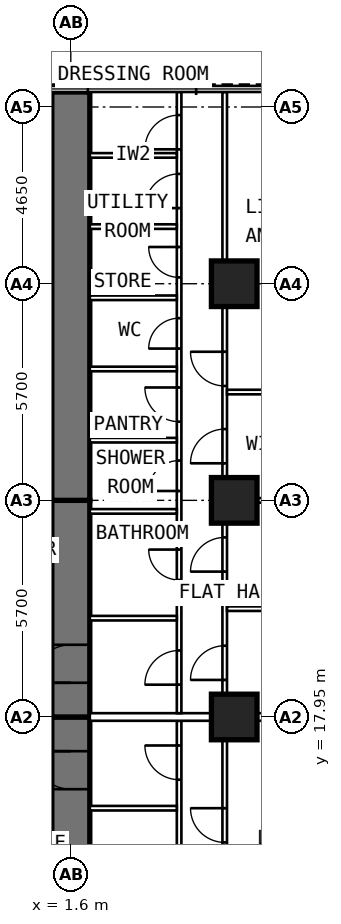
"""IFC4 building model, lengths in metres.
Left out: names, types, materials, properties, quantities, classifications, styles, units other than length and angle.
Written with IfcOpenShell. Run it as: python <this file> out.ifc"""

import sys

from ifc_helpers import new_model, si_unit, direction, frame, frame_2d, origin, origin_2d, place, context, subcontext, project, spatial, rectangle, extrude, element, fill, save


model = new_model("IFC4")
c1 = context("Model", 3, precision=1e-05, world=origin(), true_north=direction((0.0, 1.0)))
c2 = subcontext(c1, "Body", "Model", "MODEL_VIEW")
j1 = project(units=[si_unit("LENGTHUNIT", "METRE"), si_unit("PLANEANGLEUNIT", "RADIAN")], contexts=[c1])
p1 = place(None, origin())
s1 = spatial("IfcSite", under=j1, at=p1, CompositionType="ELEMENT")
p2 = place(p1, origin())
s2 = spatial("IfcBuilding", under=s1, at=p2, CompositionType="ELEMENT")
p3 = place(p2, frame((0.0, 0.0, 106.0)))
s3 = spatial("IfcBuildingStorey", under=s2, at=p3, CompositionType="ELEMENT", Elevation=106.0)
for number, where, z_axis, x_axis in (
    (1, (5.9, 17.95, 0.0), (0.0, 0.0, 1.0), (0.0, 1.0, 0.0)),
    (2, (5.9, 23.65, 0.0), (0.0, 0.0, 1.0), (0.0, 1.0, 0.0)),
    (3, (5.9, 29.35, 0.0), (0.0, 0.0, 1.0), (0.0, 1.0, 0.0)),
):
    element("IfcColumn", number, at=place(p3, frame(where, z_axis=z_axis, x_axis=x_axis)), inside=s3, PredefinedType="COLUMN", context=c2, shape_type="SweptSolid", body=[
        extrude(rectangle(XDim=1.2, YDim=1.2, at=origin_2d()), origin(), (0.0, 0.0, 1.0), 3.6),
    ])
p4 = place(p3, frame((1.6, 9.6, 0.0), z_axis=(0.0, 0.0, 1.0), x_axis=(0.0, 1.0, 0.0)))
e4 = element("IfcWall", 4, at=p4, inside=s3, PredefinedType="SHEAR", context=c2, shape_type="SweptSolid", body=[
    extrude(rectangle(XDim=8.35, YDim=1.0, at=frame_2d((4.175, 0.0))), origin(), (0.0, 0.0, 1.0), 3.6),
])
p5 = place(p4, frame((6.45, 0.0, 0.0)))
e5 = element("IfcOpeningElement", 5, at=p5, cuts=e4, PredefinedType="OPENING", context=c2, shape_type="SweptSolid", body=[
    extrude(rectangle(XDim=1.0, YDim=2.1, at=frame_2d((0.5, 1.05))), frame((0.0, 0.512, 0.0), z_axis=(0.0, -1.0, 0.0), x_axis=(1.0, 0.0, 0.0)), (0.0, 0.0, 1.0), 1.024),
])
p6 = place(p3, frame((1.6, 17.95, 0.0), z_axis=(0.0, 0.0, 1.0), x_axis=(0.0, 1.0, 0.0)))
e6 = element("IfcWall", 6, at=p6, inside=s3, PredefinedType="SHEAR", context=c2, shape_type="SweptSolid", body=[
    extrude(rectangle(XDim=5.7, YDim=1.0, at=frame_2d((2.85, 0.0))), origin(), (0.0, 0.0, 1.0), 3.6),
])
p7 = place(p6, frame((0.9, 0.0, 0.0)))
e7 = element("IfcOpeningElement", 7, at=p7, cuts=e6, PredefinedType="OPENING", context=c2, shape_type="SweptSolid", body=[
    extrude(rectangle(XDim=1.0, YDim=2.1, at=frame_2d((0.5, 1.05))), frame((0.0, 0.512, 0.0), z_axis=(0.0, -1.0, 0.0), x_axis=(1.0, 0.0, 0.0)), (0.0, 0.0, 1.0), 1.024),
])
p8 = place(p3, frame((1.6, 23.65, 0.0), z_axis=(0.0, 0.0, 1.0), x_axis=(0.0, 1.0, 0.0)))
e8 = element("IfcWall", 8, at=p8, inside=s3, PredefinedType="SHEAR", context=c2, shape_type="SweptSolid", body=[
    extrude(rectangle(XDim=10.745, YDim=1.0, at=frame_2d((5.373, 0.0))), origin(), (0.0, 0.0, 1.0), 3.6),
])
p9 = place(p3, frame((4.45, 10.1, 0.0), z_axis=(0.0, 0.0, 1.0), x_axis=(0.0, 1.0, 0.0)))
e9 = element("IfcWall", 9, at=p9, inside=s3, PredefinedType="PARTITIONING", context=c2, shape_type="SweptSolid", body=[
    extrude(rectangle(XDim=7.75, YDim=0.12, at=frame_2d((3.875, 0.0))), origin(), (0.0, 0.0, 1.0), 3.35),
])
p10 = place(p9, frame((0.56, 0.0, 0.0)))
e10 = element("IfcOpeningElement", 10, at=p10, cuts=e9, PredefinedType="OPENING", context=c2, shape_type="SweptSolid", body=[
    extrude(rectangle(XDim=0.9, YDim=2.1, at=frame_2d((0.45, 1.05))), frame((0.0, 0.072, 0.0), z_axis=(0.0, -1.0, 0.0), x_axis=(1.0, 0.0, 0.0)), (0.0, 0.0, 1.0), 0.144),
])
p11 = place(p9, frame((3.385, 0.0, 0.0)))
e11 = element("IfcOpeningElement", 11, at=p11, cuts=e9, PredefinedType="OPENING", context=c2, shape_type="SweptSolid", body=[
    extrude(rectangle(XDim=0.8, YDim=2.1, at=frame_2d((0.4, 1.05))), frame((0.0, 0.072, 0.0), z_axis=(0.0, -1.0, 0.0), x_axis=(1.0, 0.0, 0.0)), (0.0, 0.0, 1.0), 0.144),
])
p12 = place(p9, frame((6.2, 0.0, 0.0)))
e12 = element("IfcOpeningElement", 12, at=p12, cuts=e9, PredefinedType="OPENING", context=c2, shape_type="SweptSolid", body=[
    extrude(rectangle(XDim=0.9, YDim=2.1, at=frame_2d((0.45, 1.05))), frame((0.0, 0.072, 0.0), z_axis=(0.0, -1.0, 0.0), x_axis=(1.0, 0.0, 0.0)), (0.0, 0.0, 1.0), 0.144),
])
p13 = place(p3, frame((5.65, 9.6, 0.0), z_axis=(0.0, 0.0, 1.0), x_axis=(0.0, 1.0, 0.0)))
e13 = element("IfcWall", 13, at=p13, inside=s3, PredefinedType="PARTITIONING", context=c2, shape_type="SweptSolid", body=[
    extrude(rectangle(XDim=8.1, YDim=0.12, at=frame_2d((4.05, 0.0))), origin(), (0.0, 0.0, 1.0), 3.35),
])
p14 = place(p13, frame((5.05, 0.0, 0.0)))
e14 = element("IfcOpeningElement", 14, at=p14, cuts=e13, PredefinedType="OPENING", context=c2, shape_type="SweptSolid", body=[
    extrude(rectangle(XDim=0.9, YDim=2.1, at=frame_2d((0.45, 1.05))), frame((0.0, 0.072, 0.0), z_axis=(0.0, -1.0, 0.0), x_axis=(1.0, 0.0, 0.0)), (0.0, 0.0, 1.0), 0.144),
])
p15 = place(p3, frame((2.1, 15.55, 0.0), z_axis=(0.0, 0.0, 1.0), x_axis=(1.0, 0.0, 0.0)))
e15 = element("IfcWall", 15, at=p15, inside=s3, PredefinedType="PARTITIONING", context=c2, shape_type="SweptSolid", body=[
    extrude(rectangle(XDim=2.29, YDim=0.12, at=frame_2d((1.145, 0.0))), origin(), (0.0, 0.0, 1.0), 3.35),
])
p16 = place(p3, frame((4.45, 18.05, 0.0), z_axis=(0.0, 0.0, 1.0), x_axis=(0.0, 1.0, 0.0)))
e16 = element("IfcWall", 16, at=p16, inside=s3, PredefinedType="PARTITIONING", context=c2, shape_type="SweptSolid", body=[
    extrude(rectangle(XDim=16.345, YDim=0.12, at=frame_2d((8.172, 0.0))), origin(), (0.0, 0.0, 1.0), 3.35),
])
p17 = place(p16, frame((0.75, 0.0, 0.0)))
e17 = element("IfcOpeningElement", 17, at=p17, cuts=e16, PredefinedType="OPENING", context=c2, shape_type="SweptSolid", body=[
    extrude(rectangle(XDim=0.9, YDim=2.1, at=frame_2d((0.45, 1.05))), frame((0.0, 0.072, 0.0), z_axis=(0.0, -1.0, 0.0), x_axis=(1.0, 0.0, 0.0)), (0.0, 0.0, 1.0), 0.144),
])
p18 = place(p16, frame((3.505, 0.0, 0.0)))
e18 = element("IfcOpeningElement", 18, at=p18, cuts=e16, PredefinedType="OPENING", context=c2, shape_type="SweptSolid", body=[
    extrude(rectangle(XDim=0.8, YDim=2.1, at=frame_2d((0.4, 1.05))), frame((0.0, 0.072, 0.0), z_axis=(0.0, -1.0, 0.0), x_axis=(1.0, 0.0, 0.0)), (0.0, 0.0, 1.0), 0.144),
])
p19 = place(p16, frame((5.847, 0.0, 0.0)))
e19 = element("IfcOpeningElement", 19, at=p19, cuts=e16, PredefinedType="OPENING", context=c2, shape_type="SweptSolid", body=[
    extrude(rectangle(XDim=0.8, YDim=2.1, at=frame_2d((0.4, 1.05))), frame((0.0, 0.072, 0.0), z_axis=(0.0, -1.0, 0.0), x_axis=(1.0, 0.0, 0.0)), (0.0, 0.0, 1.0), 0.144),
])
p20 = place(p16, frame((7.67, 0.0, 0.0)))
e20 = element("IfcOpeningElement", 20, at=p20, cuts=e16, PredefinedType="OPENING", context=c2, shape_type="SweptSolid", body=[
    extrude(rectangle(XDim=0.9, YDim=2.1, at=frame_2d((0.45, 1.05))), frame((0.0, 0.072, 0.0), z_axis=(0.0, -1.0, 0.0), x_axis=(1.0, 0.0, 0.0)), (0.0, 0.0, 1.0), 0.144),
])
p21 = place(p16, frame((9.593, 0.0, 0.0)))
e21 = element("IfcOpeningElement", 21, at=p21, cuts=e16, PredefinedType="OPENING", context=c2, shape_type="SweptSolid", body=[
    extrude(rectangle(XDim=0.8, YDim=2.1, at=frame_2d((0.4, 1.05))), frame((0.0, 0.072, 0.0), z_axis=(0.0, -1.0, 0.0), x_axis=(1.0, 0.0, 0.0)), (0.0, 0.0, 1.0), 0.144),
])
p22 = place(p16, frame((11.467, 0.0, 0.0)))
e22 = element("IfcOpeningElement", 22, at=p22, cuts=e16, PredefinedType="OPENING", context=c2, shape_type="SweptSolid", body=[
    extrude(rectangle(XDim=0.8, YDim=2.1, at=frame_2d((0.4, 1.05))), frame((0.0, 0.072, 0.0), z_axis=(0.0, -1.0, 0.0), x_axis=(1.0, 0.0, 0.0)), (0.0, 0.0, 1.0), 0.144),
])
p23 = place(p16, frame((13.29, 0.0, 0.0)))
e23 = element("IfcOpeningElement", 23, at=p23, cuts=e16, PredefinedType="OPENING", context=c2, shape_type="SweptSolid", body=[
    extrude(rectangle(XDim=0.9, YDim=2.1, at=frame_2d((0.45, 1.05))), frame((0.0, 0.072, 0.0), z_axis=(0.0, -1.0, 0.0), x_axis=(1.0, 0.0, 0.0)), (0.0, 0.0, 1.0), 0.144),
])
p24 = place(p16, frame((14.837, 0.0, 0.0)))
e24 = element("IfcOpeningElement", 24, at=p24, cuts=e16, PredefinedType="OPENING", context=c2, shape_type="SweptSolid", body=[
    extrude(rectangle(XDim=0.9, YDim=2.1, at=frame_2d((0.45, 1.05))), frame((0.0, 0.072, 0.0), z_axis=(0.0, -1.0, 0.0), x_axis=(1.0, 0.0, 0.0)), (0.0, 0.0, 1.0), 0.144),
])
p25 = place(p3, frame((5.65, 18.05, 0.0), z_axis=(0.0, 0.0, 1.0), x_axis=(0.0, 1.0, 0.0)))
e25 = element("IfcWall", 25, at=p25, inside=s3, PredefinedType="PARTITIONING", context=c2, shape_type="SweptSolid", body=[
    extrude(rectangle(XDim=16.345, YDim=0.12, at=frame_2d((8.172, 0.0))), origin(), (0.0, 0.0, 1.0), 3.35),
])
p26 = place(p25, frame((0.875, 0.0, 0.0)))
e26 = element("IfcOpeningElement", 26, at=p26, cuts=e25, PredefinedType="OPENING", context=c2, shape_type="SweptSolid", body=[
    extrude(rectangle(XDim=0.9, YDim=2.1, at=frame_2d((0.45, 1.05))), frame((0.0, 0.072, 0.0), z_axis=(0.0, -1.0, 0.0), x_axis=(1.0, 0.0, 0.0)), (0.0, 0.0, 1.0), 0.144),
])
p27 = place(p25, frame((3.725, 0.0, 0.0)))
e27 = element("IfcOpeningElement", 27, at=p27, cuts=e25, PredefinedType="OPENING", context=c2, shape_type="SweptSolid", body=[
    extrude(rectangle(XDim=0.9, YDim=2.1, at=frame_2d((0.45, 1.05))), frame((0.0, 0.072, 0.0), z_axis=(0.0, -1.0, 0.0), x_axis=(1.0, 0.0, 0.0)), (0.0, 0.0, 1.0), 0.144),
])
p28 = place(p25, frame((6.575, 0.0, 0.0)))
e28 = element("IfcOpeningElement", 28, at=p28, cuts=e25, PredefinedType="OPENING", context=c2, shape_type="SweptSolid", body=[
    extrude(rectangle(XDim=0.9, YDim=2.1, at=frame_2d((0.45, 1.05))), frame((0.0, 0.072, 0.0), z_axis=(0.0, -1.0, 0.0), x_axis=(1.0, 0.0, 0.0)), (0.0, 0.0, 1.0), 0.144),
])
p29 = place(p25, frame((8.61, 0.0, 0.0)))
e29 = element("IfcOpeningElement", 29, at=p29, cuts=e25, PredefinedType="OPENING", context=c2, shape_type="SweptSolid", body=[
    extrude(rectangle(XDim=0.9, YDim=2.1, at=frame_2d((0.45, 1.05))), frame((0.0, 0.072, 0.0), z_axis=(0.0, -1.0, 0.0), x_axis=(1.0, 0.0, 0.0)), (0.0, 0.0, 1.0), 0.144),
])
p30 = place(p3, frame((5.71, 20.8, 0.0), z_axis=(0.0, 0.0, 1.0), x_axis=(1.0, 0.0, 0.0)))
e30 = element("IfcWall", 30, at=p30, inside=s3, PredefinedType="PARTITIONING", context=c2, shape_type="SweptSolid", body=[
    extrude(rectangle(XDim=4.99, YDim=0.12, at=frame_2d((2.495, 0.0))), origin(), (0.0, 0.0, 1.0), 3.35),
])
p31 = place(p3, frame((5.71, 23.65, 0.0), z_axis=(0.0, 0.0, 1.0), x_axis=(1.0, 0.0, 0.0)))
e31 = element("IfcWall", 31, at=p31, inside=s3, PredefinedType="PARTITIONING", context=c2, shape_type="SweptSolid", body=[
    extrude(rectangle(XDim=4.99, YDim=0.12, at=frame_2d((2.495, 0.0))), origin(), (0.0, 0.0, 1.0), 2.45),
])
p32 = place(p3, frame((5.71, 26.5, 0.0), z_axis=(0.0, 0.0, 1.0), x_axis=(1.0, 0.0, 0.0)))
e32 = element("IfcWall", 32, at=p32, inside=s3, PredefinedType="PARTITIONING", context=c2, shape_type="SweptSolid", body=[
    extrude(rectangle(XDim=4.99, YDim=0.12, at=frame_2d((2.495, 0.0))), origin(), (0.0, 0.0, 1.0), 3.35),
])
p33 = place(p3, frame((2.1, 20.55, 0.0), z_axis=(0.0, 0.0, 1.0), x_axis=(1.0, 0.0, 0.0)))
e33 = element("IfcWall", 33, at=p33, inside=s3, PredefinedType="PARTITIONING", context=c2, shape_type="SweptSolid", body=[
    extrude(rectangle(XDim=2.29, YDim=0.12, at=frame_2d((1.145, 0.0))), origin(), (0.0, 0.0, 1.0), 3.35),
])
p34 = place(p3, frame((2.1, 23.36, 0.0), z_axis=(0.0, 0.0, 1.0), x_axis=(1.0, 0.0, 0.0)))
e34 = element("IfcWall", 34, at=p34, inside=s3, PredefinedType="PARTITIONING", context=c2, shape_type="SweptSolid", body=[
    extrude(rectangle(XDim=2.29, YDim=0.12, at=frame_2d((1.145, 0.0))), origin(), (0.0, 0.0, 1.0), 2.45),
])
for number, where, z_axis, x_axis in (
    (35, (2.1, 25.233, 0.0), (0.0, 0.0, 1.0), (1.0, 0.0, 0.0)),
    (36, (2.1, 27.107, 0.0), (0.0, 0.0, 1.0), (1.0, 0.0, 0.0)),
):
    element("IfcWall", number, at=place(p3, frame(where, z_axis=z_axis, x_axis=x_axis)), inside=s3, PredefinedType="PARTITIONING", context=c2, shape_type="SweptSolid", body=[
        extrude(rectangle(XDim=2.29, YDim=0.12, at=frame_2d((1.145, 0.0))), origin(), (0.0, 0.0, 1.0), 3.35),
    ])
p35 = place(p3, frame((2.1, 28.98, 0.0), z_axis=(0.0, 0.0, 1.0), x_axis=(1.0, 0.0, 0.0)))
e37 = element("IfcWall", 37, at=p35, inside=s3, PredefinedType="PARTITIONING", context=c2, shape_type="SweptSolid", body=[
    extrude(rectangle(XDim=2.29, YDim=0.12, at=frame_2d((1.145, 0.0))), origin(), (0.0, 0.0, 1.0), 2.45),
])
for number, where, z_axis, x_axis in (
    (38, (2.1, 30.853, 0.0), (0.0, 0.0, 1.0), (1.0, 0.0, 0.0)),
    (39, (2.1, 32.727, 0.0), (0.0, 0.0, 1.0), (1.0, 0.0, 0.0)),
):
    element("IfcWall", number, at=place(p3, frame(where, z_axis=z_axis, x_axis=x_axis)), inside=s3, PredefinedType="PARTITIONING", context=c2, shape_type="SweptSolid", body=[
        extrude(rectangle(XDim=2.29, YDim=0.12, at=frame_2d((1.145, 0.0))), origin(), (0.0, 0.0, 1.0), 3.35),
    ])
p36 = place(p3, frame((2.1, 17.95, 0.0), z_axis=(0.0, 0.0, 1.0), x_axis=(1.0, 0.0, 0.0)))
e40 = element("IfcWall", 40, at=p36, inside=s3, PredefinedType="PARTITIONING", context=c2, shape_type="SweptSolid", body=[
    extrude(rectangle(XDim=8.6, YDim=0.2, at=frame_2d((4.3, 0.0))), origin(), (0.0, 0.0, 1.0), 2.45),
])
p37 = place(p5, origin())
e41 = element("IfcDoor", 41, at=p37, inside=s3, OperationType="SINGLE_SWING_RIGHT", PredefinedType="DOOR", context=c2, shape_type="SweptSolid", body=[
    extrude(rectangle(XDim=1.0, YDim=2.1, at=frame_2d((0.5, 1.05))), frame((0.0, 0.25, 0.0), z_axis=(0.0, -1.0, 0.0), x_axis=(1.0, 0.0, 0.0)), (0.0, 0.0, 1.0), 0.5),
])
fill(e5, e41)
p38 = place(p14, origin())
e42 = element("IfcDoor", 42, at=p38, inside=s3, OperationType="SINGLE_SWING_RIGHT", PredefinedType="DOOR", context=c2, shape_type="SweptSolid", body=[
    extrude(rectangle(XDim=0.9, YDim=2.1, at=frame_2d((0.45, 1.05))), frame((0.0, 0.025, 0.0), z_axis=(0.0, -1.0, 0.0), x_axis=(1.0, 0.0, 0.0)), (0.0, 0.0, 1.0), 0.05),
])
fill(e14, e42)
p39 = place(p12, origin())
e43 = element("IfcDoor", 43, at=p39, inside=s3, OperationType="SINGLE_SWING_RIGHT", PredefinedType="DOOR", context=c2, shape_type="SweptSolid", body=[
    extrude(rectangle(XDim=0.9, YDim=2.1, at=frame_2d((0.45, 1.05))), frame((0.0, 0.025, 0.0), z_axis=(0.0, -1.0, 0.0), x_axis=(1.0, 0.0, 0.0)), (0.0, 0.0, 1.0), 0.05),
])
fill(e12, e43)
p40 = place(p7, origin())
e44 = element("IfcDoor", 44, at=p40, inside=s3, OperationType="SINGLE_SWING_LEFT", PredefinedType="DOOR", context=c2, shape_type="SweptSolid", body=[
    extrude(rectangle(XDim=1.0, YDim=2.1, at=frame_2d((0.5, 1.05))), frame((0.0, 0.25, 0.0), z_axis=(0.0, -1.0, 0.0), x_axis=(1.0, 0.0, 0.0)), (0.0, 0.0, 1.0), 0.5),
])
fill(e7, e44)
p41 = place(p26, origin())
e45 = element("IfcDoor", 45, at=p41, inside=s3, OperationType="SINGLE_SWING_LEFT", PredefinedType="DOOR", context=c2, shape_type="SweptSolid", body=[
    extrude(rectangle(XDim=0.9, YDim=2.1, at=frame_2d((0.45, 1.05))), frame((0.0, 0.025, 0.0), z_axis=(0.0, -1.0, 0.0), x_axis=(1.0, 0.0, 0.0)), (0.0, 0.0, 1.0), 0.05),
])
fill(e26, e45)
p42 = place(p27, origin())
e46 = element("IfcDoor", 46, at=p42, inside=s3, OperationType="SINGLE_SWING_LEFT", PredefinedType="DOOR", context=c2, shape_type="SweptSolid", body=[
    extrude(rectangle(XDim=0.9, YDim=2.1, at=frame_2d((0.45, 1.05))), frame((0.0, 0.025, 0.0), z_axis=(0.0, -1.0, 0.0), x_axis=(1.0, 0.0, 0.0)), (0.0, 0.0, 1.0), 0.05),
])
fill(e27, e46)
p43 = place(p28, origin())
e47 = element("IfcDoor", 47, at=p43, inside=s3, OperationType="SINGLE_SWING_LEFT", PredefinedType="DOOR", context=c2, shape_type="SweptSolid", body=[
    extrude(rectangle(XDim=0.9, YDim=2.1, at=frame_2d((0.45, 1.05))), frame((0.0, 0.025, 0.0), z_axis=(0.0, -1.0, 0.0), x_axis=(1.0, 0.0, 0.0)), (0.0, 0.0, 1.0), 0.05),
])
fill(e28, e47)
p44 = place(p29, origin())
e48 = element("IfcDoor", 48, at=p44, inside=s3, OperationType="SINGLE_SWING_RIGHT", PredefinedType="DOOR", context=c2, shape_type="SweptSolid", body=[
    extrude(rectangle(XDim=0.9, YDim=2.1, at=frame_2d((0.45, 1.05))), frame((0.0, 0.025, 0.0), z_axis=(0.0, -1.0, 0.0), x_axis=(1.0, 0.0, 0.0)), (0.0, 0.0, 1.0), 0.05),
])
fill(e29, e48)
p45 = place(p17, origin())
e49 = element("IfcDoor", 49, at=p45, inside=s3, OperationType="SINGLE_SWING_LEFT", PredefinedType="DOOR", context=c2, shape_type="SweptSolid", body=[
    extrude(rectangle(XDim=0.9, YDim=2.1, at=frame_2d((0.45, 1.05))), frame((0.0, 0.025, 0.0), z_axis=(0.0, -1.0, 0.0), x_axis=(1.0, 0.0, 0.0)), (0.0, 0.0, 1.0), 0.05),
])
fill(e17, e49)
p46 = place(p18, origin())
e50 = element("IfcDoor", 50, at=p46, inside=s3, OperationType="SINGLE_SWING_RIGHT", PredefinedType="DOOR", context=c2, shape_type="SweptSolid", body=[
    extrude(rectangle(XDim=0.8, YDim=2.1, at=frame_2d((0.4, 1.05))), frame((0.0, 0.025, 0.0), z_axis=(0.0, -1.0, 0.0), x_axis=(1.0, 0.0, 0.0)), (0.0, 0.0, 1.0), 0.05),
])
fill(e18, e50)
p47 = place(p19, origin())
e51 = element("IfcDoor", 51, at=p47, inside=s3, OperationType="SINGLE_SWING_LEFT", PredefinedType="DOOR", context=c2, shape_type="SweptSolid", body=[
    extrude(rectangle(XDim=0.8, YDim=2.1, at=frame_2d((0.4, 1.05))), frame((0.0, 0.025, 0.0), z_axis=(0.0, -1.0, 0.0), x_axis=(1.0, 0.0, 0.0)), (0.0, 0.0, 1.0), 0.05),
])
fill(e19, e51)
p48 = place(p20, origin())
e52 = element("IfcDoor", 52, at=p48, inside=s3, OperationType="SINGLE_SWING_RIGHT", PredefinedType="DOOR", context=c2, shape_type="SweptSolid", body=[
    extrude(rectangle(XDim=0.9, YDim=2.1, at=frame_2d((0.45, 1.05))), frame((0.0, 0.025, 0.0), z_axis=(0.0, -1.0, 0.0), x_axis=(1.0, 0.0, 0.0)), (0.0, 0.0, 1.0), 0.05),
])
fill(e20, e52)
p49 = place(p21, origin())
e53 = element("IfcDoor", 53, at=p49, inside=s3, OperationType="SINGLE_SWING_LEFT", PredefinedType="DOOR", context=c2, shape_type="SweptSolid", body=[
    extrude(rectangle(XDim=0.8, YDim=2.1, at=frame_2d((0.4, 1.05))), frame((0.0, 0.025, 0.0), z_axis=(0.0, -1.0, 0.0), x_axis=(1.0, 0.0, 0.0)), (0.0, 0.0, 1.0), 0.05),
])
fill(e21, e53)
p50 = place(p22, origin())
e54 = element("IfcDoor", 54, at=p50, inside=s3, OperationType="SINGLE_SWING_RIGHT", PredefinedType="DOOR", context=c2, shape_type="SweptSolid", body=[
    extrude(rectangle(XDim=0.8, YDim=2.1, at=frame_2d((0.4, 1.05))), frame((0.0, 0.025, 0.0), z_axis=(0.0, -1.0, 0.0), x_axis=(1.0, 0.0, 0.0)), (0.0, 0.0, 1.0), 0.05),
])
fill(e22, e54)
p51 = place(p23, origin())
e55 = element("IfcDoor", 55, at=p51, inside=s3, OperationType="SINGLE_SWING_LEFT", PredefinedType="DOOR", context=c2, shape_type="SweptSolid", body=[
    extrude(rectangle(XDim=0.9, YDim=2.1, at=frame_2d((0.45, 1.05))), frame((0.0, 0.025, 0.0), z_axis=(0.0, -1.0, 0.0), x_axis=(1.0, 0.0, 0.0)), (0.0, 0.0, 1.0), 0.05),
])
fill(e23, e55)
p52 = place(p24, origin())
e56 = element("IfcDoor", 56, at=p52, inside=s3, OperationType="SINGLE_SWING_LEFT", PredefinedType="DOOR", context=c2, shape_type="SweptSolid", body=[
    extrude(rectangle(XDim=0.9, YDim=2.1, at=frame_2d((0.45, 1.05))), frame((0.0, 0.025, 0.0), z_axis=(0.0, -1.0, 0.0), x_axis=(1.0, 0.0, 0.0)), (0.0, 0.0, 1.0), 0.05),
])
fill(e24, e56)
save(model, sys.argv[1])
